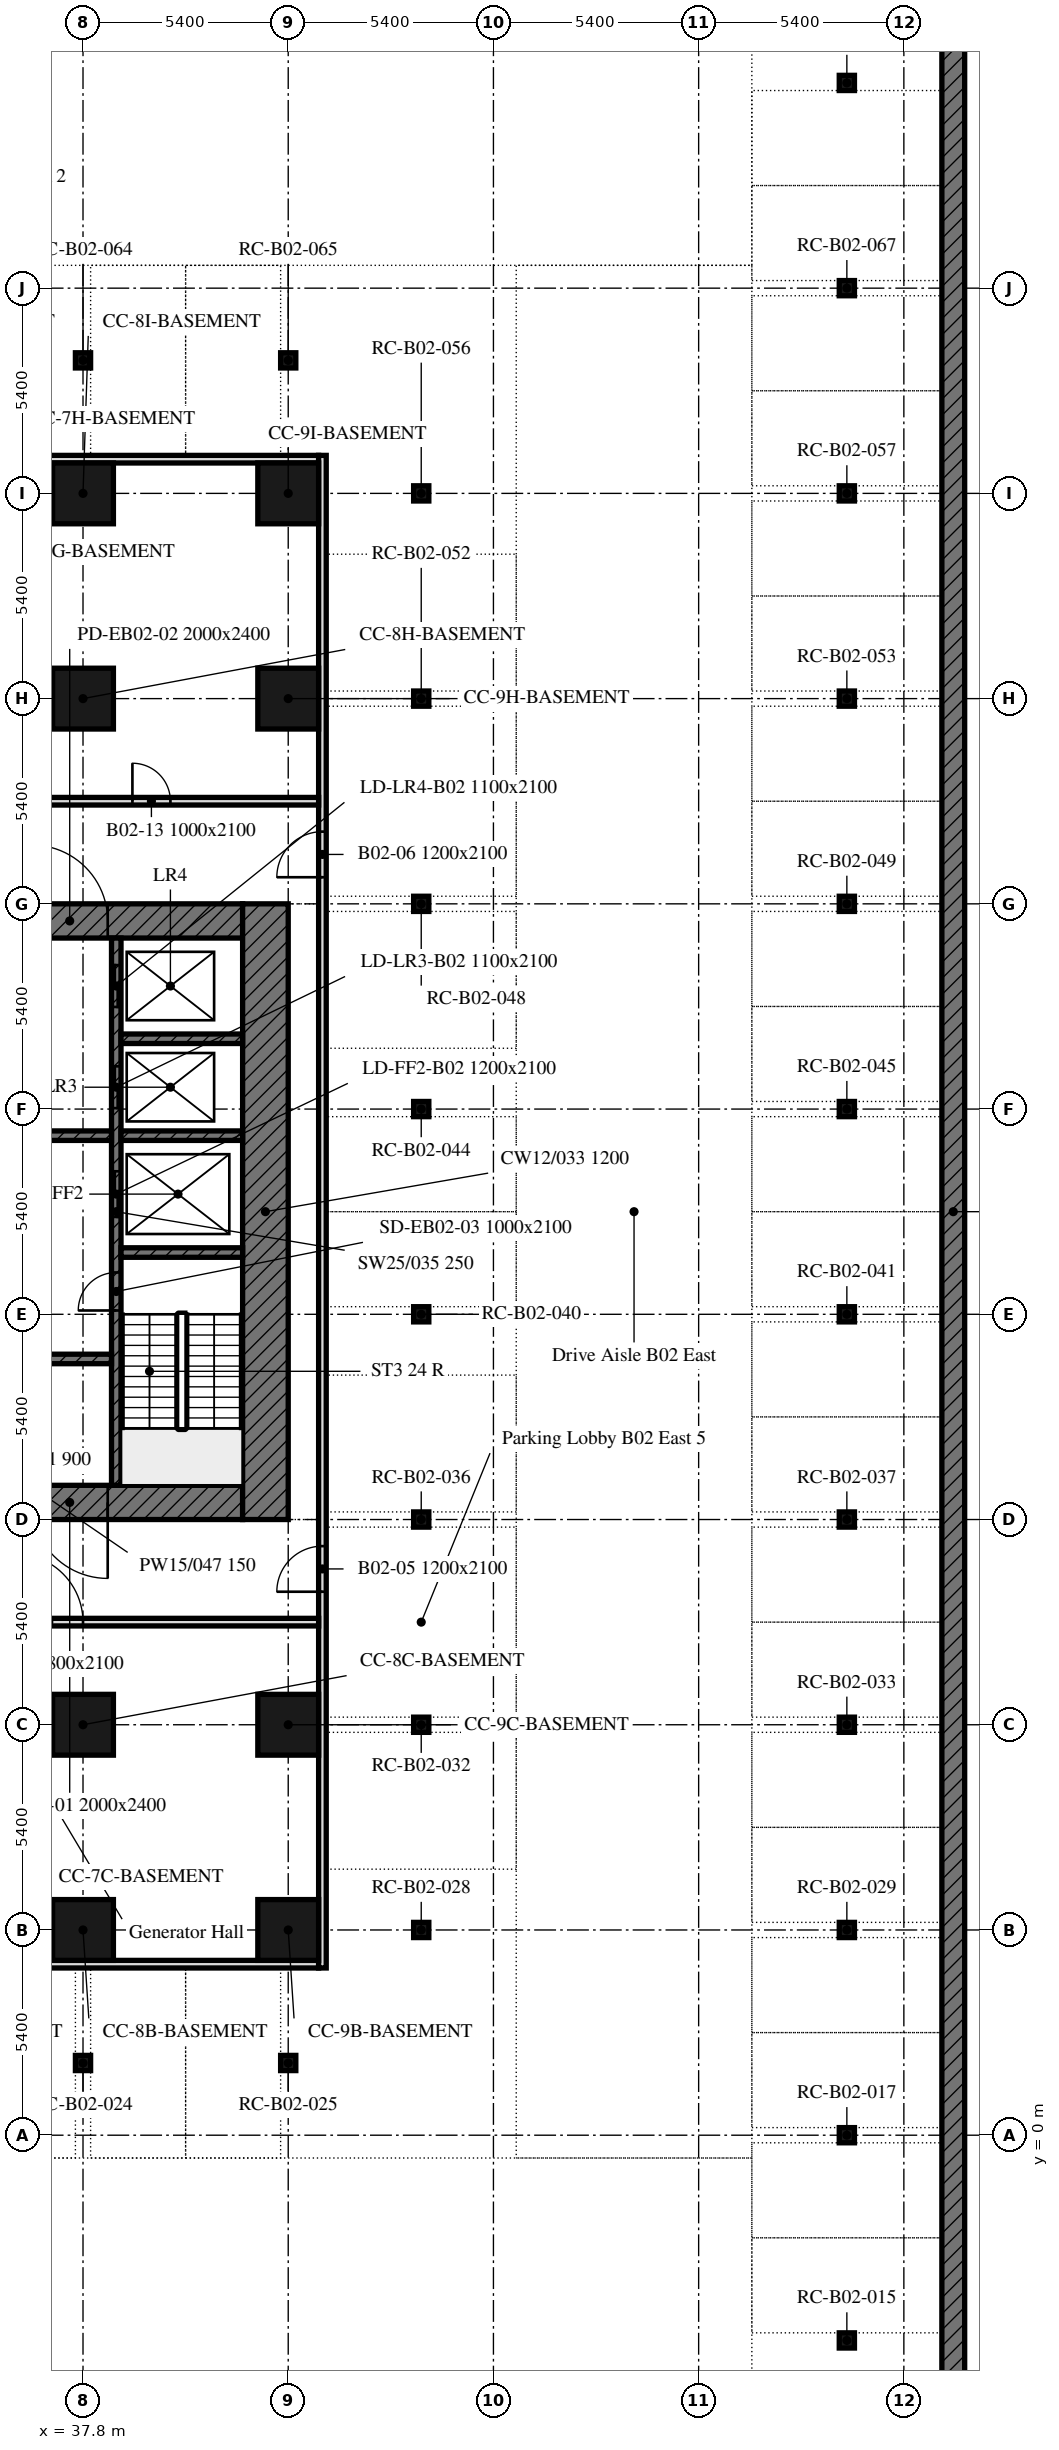
"""IFC4 building model, lengths in metres.
Left out: names, types, materials, properties, quantities, classifications, styles, units other than length and angle.
Written with IfcOpenShell. Run it as: python <this file> out.ifc"""

import sys

from ifc_helpers import new_model, si_unit, direction, frame, frame_2d, origin, origin_2d, place, context, subcontext, project, spatial, rectangle, extrude, element, fill, save


model = new_model("IFC4")
c1 = context("Model", 3, precision=1e-05, world=origin(), true_north=direction((0.0, 1.0)))
c2 = subcontext(c1, "Body", "Model", "MODEL_VIEW")
j1 = project(units=[si_unit("LENGTHUNIT", "METRE"), si_unit("PLANEANGLEUNIT", "RADIAN")], contexts=[c1])
p1 = place(None, origin())
s1 = spatial("IfcSite", under=j1, at=p1, CompositionType="ELEMENT")
p2 = place(p1, origin())
s2 = spatial("IfcBuilding", under=s1, at=p2, CompositionType="ELEMENT")
p3 = place(p2, frame((0.0, 0.0, -9.0)))
s3 = spatial("IfcBuildingStorey", under=s2, at=p3, CompositionType="ELEMENT", Elevation=-9.0)
p4 = place(p3, frame((60.7, -12.4, 0.0), z_axis=(0.0, 0.0, 1.0), x_axis=(0.0, 1.0, 0.0)))
e1 = element("IfcWall", 1, at=p4, inside=s3, PredefinedType="SOLIDWALL", context=c2, shape_type="SweptSolid", body=[
    extrude(rectangle(XDim=73.4, YDim=0.6, at=frame_2d((36.7, 0.0))), origin(), (0.0, 0.0, 1.0), 4.1),
])
for number, where, z_axis, x_axis in (
    (2, (37.8, 5.4, 0.0), (0.0, 0.0, 1.0), (1.0, 0.0, 0.0)),
    (3, (43.2, 5.4, 0.0), (0.0, 0.0, 1.0), (1.0, 0.0, 0.0)),
    (4, (37.8, 10.8, 0.0), (0.0, 0.0, 1.0), (1.0, 0.0, 0.0)),
    (5, (43.2, 10.8, 0.0), (0.0, 0.0, 1.0), (1.0, 0.0, 0.0)),
    (6, (37.8, 37.8, 0.0), (0.0, 0.0, 1.0), (1.0, 0.0, 0.0)),
    (7, (43.2, 37.8, 0.0), (0.0, 0.0, 1.0), (1.0, 0.0, 0.0)),
    (8, (37.8, 43.2, 0.0), (0.0, 0.0, 1.0), (1.0, 0.0, 0.0)),
    (9, (43.2, 43.2, 0.0), (0.0, 0.0, 1.0), (1.0, 0.0, 0.0)),
):
    element("IfcColumn", number, at=place(p3, frame(where, z_axis=z_axis, x_axis=x_axis)), inside=s3, PredefinedType="COLUMN", context=c2, shape_type="SweptSolid", body=[
        extrude(rectangle(XDim=1.6, YDim=1.6, at=origin_2d()), origin(), (0.0, 0.0, 1.0), 4.1),
    ])
for number, where, z_axis, x_axis in (
    (10, (57.9, -5.4, 0.0), (0.0, 0.0, 1.0), (1.0, 0.0, 0.0)),
    (11, (57.9, 0.0, 0.0), (0.0, 0.0, 1.0), (1.0, 0.0, 0.0)),
    (12, (37.8, 1.9, 0.0), (0.0, 0.0, 1.0), (1.0, 0.0, 0.0)),
    (13, (43.2, 1.9, 0.0), (0.0, 0.0, 1.0), (1.0, 0.0, 0.0)),
    (14, (46.7, 5.4, 0.0), (0.0, 0.0, 1.0), (1.0, 0.0, 0.0)),
    (15, (57.9, 5.4, 0.0), (0.0, 0.0, 1.0), (1.0, 0.0, 0.0)),
    (16, (46.7, 10.8, 0.0), (0.0, 0.0, 1.0), (1.0, 0.0, 0.0)),
    (17, (57.9, 10.8, 0.0), (0.0, 0.0, 1.0), (1.0, 0.0, 0.0)),
    (18, (46.7, 16.2, 0.0), (0.0, 0.0, 1.0), (1.0, 0.0, 0.0)),
    (19, (57.9, 16.2, 0.0), (0.0, 0.0, 1.0), (1.0, 0.0, 0.0)),
    (20, (46.7, 21.6, 0.0), (0.0, 0.0, 1.0), (1.0, 0.0, 0.0)),
    (21, (57.9, 21.6, 0.0), (0.0, 0.0, 1.0), (1.0, 0.0, 0.0)),
    (22, (46.7, 27.0, 0.0), (0.0, 0.0, 1.0), (1.0, 0.0, 0.0)),
    (23, (57.9, 27.0, 0.0), (0.0, 0.0, 1.0), (1.0, 0.0, 0.0)),
    (24, (46.7, 32.4, 0.0), (0.0, 0.0, 1.0), (1.0, 0.0, 0.0)),
    (25, (57.9, 32.4, 0.0), (0.0, 0.0, 1.0), (1.0, 0.0, 0.0)),
    (26, (46.7, 37.8, 0.0), (0.0, 0.0, 1.0), (1.0, 0.0, 0.0)),
    (27, (57.9, 37.8, 0.0), (0.0, 0.0, 1.0), (1.0, 0.0, 0.0)),
    (28, (46.7, 43.2, 0.0), (0.0, 0.0, 1.0), (1.0, 0.0, 0.0)),
    (29, (57.9, 43.2, 0.0), (0.0, 0.0, 1.0), (1.0, 0.0, 0.0)),
    (30, (37.8, 46.7, 0.0), (0.0, 0.0, 1.0), (1.0, 0.0, 0.0)),
    (31, (43.2, 46.7, 0.0), (0.0, 0.0, 1.0), (1.0, 0.0, 0.0)),
    (32, (57.9, 48.6, 0.0), (0.0, 0.0, 1.0), (1.0, 0.0, 0.0)),
    (33, (57.9, 54.0, 0.0), (0.0, 0.0, 1.0), (1.0, 0.0, 0.0)),
):
    element("IfcColumn", number, at=place(p3, frame(where, z_axis=z_axis, x_axis=x_axis)), inside=s3, PredefinedType="COLUMN", context=c2, shape_type="SweptSolid", body=[
        extrude(rectangle(XDim=0.4, YDim=0.4, at=origin_2d()), origin(), (0.0, 0.0, 1.0), 4.1),
    ])
p5 = place(p3, frame((4.6, 4.5, 0.0), z_axis=(0.0, 0.0, 1.0), x_axis=(1.0, 0.0, 0.0)))
e34 = element("IfcWall", 34, at=p5, inside=s3, PredefinedType="PARTITIONING", context=c2, shape_type="SweptSolid", body=[
    extrude(rectangle(XDim=39.4, YDim=0.2, at=frame_2d((19.7, 0.0))), origin(), (0.0, 0.0, 1.0), 4.1),
])
p6 = place(p5, frame((18.3, 0.0, 0.0)))
e35 = element("IfcOpeningElement", 35, at=p6, cuts=e34, PredefinedType="OPENING", context=c2, shape_type="SweptSolid", body=[
    extrude(rectangle(XDim=1.2, YDim=2.1, at=frame_2d((0.6, 1.05))), frame((0.0, 0.11, 0.0), z_axis=(0.0, -1.0, 0.0), x_axis=(1.0, 0.0, 0.0)), (0.0, 0.0, 1.0), 0.22),
])
p7 = place(p3, frame((4.6, 44.1, 0.0), z_axis=(0.0, 0.0, 1.0), x_axis=(1.0, 0.0, 0.0)))
e36 = element("IfcWall", 36, at=p7, inside=s3, PredefinedType="PARTITIONING", context=c2, shape_type="SweptSolid", body=[
    extrude(rectangle(XDim=39.4, YDim=0.2, at=frame_2d((19.7, 0.0))), origin(), (0.0, 0.0, 1.0), 4.1),
])
p8 = place(p7, frame((23.4, 0.0, 0.0)))
e37 = element("IfcOpeningElement", 37, at=p8, cuts=e36, PredefinedType="OPENING", context=c2, shape_type="SweptSolid", body=[
    extrude(rectangle(XDim=1.2, YDim=2.1, at=frame_2d((0.6, 1.05))), frame((0.0, 0.11, 0.0), z_axis=(0.0, -1.0, 0.0), x_axis=(1.0, 0.0, 0.0)), (0.0, 0.0, 1.0), 0.22),
])
p9 = place(p3, frame((44.1, 4.4, 0.0), z_axis=(0.0, 0.0, 1.0), x_axis=(0.0, 1.0, 0.0)))
e38 = element("IfcWall", 38, at=p9, inside=s3, PredefinedType="PARTITIONING", context=c2, shape_type="SweptSolid", body=[
    extrude(rectangle(XDim=39.8, YDim=0.2, at=frame_2d((19.9, 0.0))), origin(), (0.0, 0.0, 1.0), 4.1),
])
p10 = place(p9, frame((9.9, 0.0, 0.0)))
e39 = element("IfcOpeningElement", 39, at=p10, cuts=e38, PredefinedType="OPENING", context=c2, shape_type="SweptSolid", body=[
    extrude(rectangle(XDim=1.2, YDim=2.1, at=frame_2d((0.6, 1.05))), frame((0.0, 0.11, 0.0), z_axis=(0.0, -1.0, 0.0), x_axis=(1.0, 0.0, 0.0)), (0.0, 0.0, 1.0), 0.22),
])
p11 = place(p9, frame((28.7, 0.0, 0.0)))
e40 = element("IfcOpeningElement", 40, at=p11, cuts=e38, PredefinedType="OPENING", context=c2, shape_type="SweptSolid", body=[
    extrude(rectangle(XDim=1.2, YDim=2.1, at=frame_2d((0.6, 1.05))), frame((0.0, 0.11, 0.0), z_axis=(0.0, -1.0, 0.0), x_axis=(1.0, 0.0, 0.0)), (0.0, 0.0, 1.0), 0.22),
])
p12 = place(p3, frame((29.8, 13.5, 0.0), z_axis=(0.0, 0.0, 1.0), x_axis=(1.0, 0.0, 0.0)))
e41 = element("IfcWall", 41, at=p12, inside=s3, PredefinedType="PARTITIONING", context=c2, shape_type="SweptSolid", body=[
    extrude(rectangle(XDim=14.2, YDim=0.2, at=frame_2d((7.1, 0.0))), origin(), (0.0, 0.0, 1.0), 4.1),
])
p13 = place(p12, frame((6.2, 0.0, 0.0)))
e42 = element("IfcOpeningElement", 42, at=p13, cuts=e41, PredefinedType="OPENING", context=c2, shape_type="SweptSolid", body=[
    extrude(rectangle(XDim=1.8, YDim=2.1, at=frame_2d((0.9, 1.05))), frame((0.0, 0.11, 0.0), z_axis=(0.0, -1.0, 0.0), x_axis=(1.0, 0.0, 0.0)), (0.0, 0.0, 1.0), 0.22),
])
p14 = place(p3, frame((35.2, 35.1, 0.0), z_axis=(0.0, 0.0, 1.0), x_axis=(1.0, 0.0, 0.0)))
e43 = element("IfcWall", 43, at=p14, inside=s3, PredefinedType="PARTITIONING", context=c2, shape_type="SweptSolid", body=[
    extrude(rectangle(XDim=8.8, YDim=0.2, at=frame_2d((4.4, 0.0))), origin(), (0.0, 0.0, 1.0), 4.1),
])
p15 = place(p14, frame((3.9, 0.0, 0.0)))
e44 = element("IfcOpeningElement", 44, at=p15, cuts=e43, PredefinedType="OPENING", context=c2, shape_type="SweptSolid", body=[
    extrude(rectangle(XDim=1.0, YDim=2.1, at=frame_2d((0.5, 1.05))), frame((0.0, 0.11, 0.0), z_axis=(0.0, -1.0, 0.0), x_axis=(1.0, 0.0, 0.0)), (0.0, 0.0, 1.0), 0.22),
])
p16 = place(p3, frame((42.0, 16.65, 0.0), z_axis=(0.0, 0.0, 1.0), x_axis=(-1.0, 0.0, 0.0)))
e45 = element("IfcWall", 45, at=p16, inside=s3, PredefinedType="SOLIDWALL", context=c2, shape_type="SweptSolid", body=[
    extrude(rectangle(XDim=11.1, YDim=0.9, at=frame_2d((5.55, 0.0))), origin(), (0.0, 0.0, 1.0), 4.1),
])
p17 = place(p16, frame((3.55, 0.0, 0.0)))
e46 = element("IfcOpeningElement", 46, at=p17, cuts=e45, PredefinedType="OPENING", context=c2, shape_type="SweptSolid", body=[
    extrude(rectangle(XDim=2.0, YDim=2.4, at=frame_2d((1.0, 1.2))), frame((0.0, 0.45, 0.0), z_axis=(0.0, -1.0, 0.0), x_axis=(1.0, 0.0, 0.0)), (0.0, 0.0, 1.0), 0.9),
])
p18 = place(p3, frame((30.9, 31.95, 0.0), z_axis=(0.0, 0.0, 1.0), x_axis=(1.0, 0.0, 0.0)))
e47 = element("IfcWall", 47, at=p18, inside=s3, PredefinedType="SOLIDWALL", context=c2, shape_type="SweptSolid", body=[
    extrude(rectangle(XDim=11.1, YDim=0.9, at=frame_2d((5.55, 0.0))), origin(), (0.0, 0.0, 1.0), 4.1),
])
p19 = place(p18, frame((5.55, 0.0, 0.0)))
e48 = element("IfcOpeningElement", 48, at=p19, cuts=e47, PredefinedType="OPENING", context=c2, shape_type="SweptSolid", body=[
    extrude(rectangle(XDim=2.0, YDim=2.4, at=frame_2d((1.0, 1.2))), frame((0.0, 0.45, 0.0), z_axis=(0.0, -1.0, 0.0), x_axis=(1.0, 0.0, 0.0)), (0.0, 0.0, 1.0), 0.9),
])
p20 = place(p3, frame((42.6, 32.4, 0.0), z_axis=(0.0, 0.0, 1.0), x_axis=(0.0, -1.0, 0.0)))
e49 = element("IfcWall", 49, at=p20, inside=s3, PredefinedType="SOLIDWALL", context=c2, shape_type="SweptSolid", body=[
    extrude(rectangle(XDim=16.2, YDim=1.2, at=frame_2d((8.1, 0.0))), origin(), (0.0, 0.0, 1.0), 4.1),
])
p21 = place(p3, frame((38.675, 17.1, 0.0), z_axis=(0.0, 0.0, 1.0), x_axis=(0.0, 1.0, 0.0)))
e50 = element("IfcWall", 50, at=p21, inside=s3, PredefinedType="SOLIDWALL", context=c2, shape_type="SweptSolid", body=[
    extrude(rectangle(XDim=14.4, YDim=0.25, at=frame_2d((7.2, 0.0))), origin(), (0.0, 0.0, 1.0), 4.1),
])
p22 = place(p21, frame((4.6, 0.0, 0.0)))
e51 = element("IfcOpeningElement", 51, at=p22, cuts=e50, PredefinedType="OPENING", context=c2, shape_type="SweptSolid", body=[
    extrude(rectangle(XDim=1.0, YDim=2.1, at=frame_2d((0.5, 1.05))), frame((0.0, 0.125, 0.0), z_axis=(0.0, -1.0, 0.0), x_axis=(1.0, 0.0, 0.0)), (0.0, 0.0, 1.0), 0.25),
])
p23 = place(p21, frame((7.062, 0.0, 0.0)))
e52 = element("IfcOpeningElement", 52, at=p23, cuts=e50, PredefinedType="OPENING", context=c2, shape_type="SweptSolid", body=[
    extrude(rectangle(XDim=1.2, YDim=2.1, at=frame_2d((0.6, 1.05))), frame((0.0, 0.125, 0.0), z_axis=(0.0, -1.0, 0.0), x_axis=(1.0, 0.0, 0.0)), (0.0, 0.0, 1.0), 0.25),
])
p24 = place(p21, frame((9.925, 0.0, 0.0)))
e53 = element("IfcOpeningElement", 53, at=p24, cuts=e50, PredefinedType="OPENING", context=c2, shape_type="SweptSolid", body=[
    extrude(rectangle(XDim=1.1, YDim=2.1, at=frame_2d((0.55, 1.05))), frame((0.0, 0.125, 0.0), z_axis=(0.0, -1.0, 0.0), x_axis=(1.0, 0.0, 0.0)), (0.0, 0.0, 1.0), 0.25),
])
p25 = place(p21, frame((12.587, 0.0, 0.0)))
e54 = element("IfcOpeningElement", 54, at=p25, cuts=e50, PredefinedType="OPENING", context=c2, shape_type="SweptSolid", body=[
    extrude(rectangle(XDim=1.1, YDim=2.1, at=frame_2d((0.55, 1.05))), frame((0.0, 0.125, 0.0), z_axis=(0.0, -1.0, 0.0), x_axis=(1.0, 0.0, 0.0)), (0.0, 0.0, 1.0), 0.25),
])
for number, where, z_axis, x_axis in (
    (55, (38.8, 23.225, 0.0), (0.0, 0.0, 1.0), (1.0, 0.0, 0.0)),
    (56, (38.8, 26.3, 0.0), (0.0, 0.0, 1.0), (1.0, 0.0, 0.0)),
):
    element("IfcWall", number, at=place(p3, frame(where, z_axis=z_axis, x_axis=x_axis)), inside=s3, PredefinedType="SOLIDWALL", context=c2, shape_type="SweptSolid", body=[
        extrude(rectangle(XDim=3.2, YDim=0.25, at=frame_2d((1.6, 0.0))), origin(), (0.0, 0.0, 1.0), 4.1),
    ])
for number, where, z_axis, x_axis in (
    (57, (35.8, 26.3, 0.0), (0.0, 0.0, 1.0), (1.0, 0.0, 0.0)),
    (58, (35.8, 20.425, 0.0), (0.0, 0.0, 1.0), (1.0, 0.0, 0.0)),
):
    element("IfcWall", number, at=place(p3, frame(where, z_axis=z_axis, x_axis=x_axis)), inside=s3, PredefinedType="SOLIDWALL", context=c2, shape_type="SweptSolid", body=[
        extrude(rectangle(XDim=2.75, YDim=0.25, at=frame_2d((1.375, 0.0))), origin(), (0.0, 0.0, 1.0), 4.1),
    ])
p26 = place(p3, frame((38.8, 28.85, 0.0), z_axis=(0.0, 0.0, 1.0), x_axis=(1.0, 0.0, 0.0)))
e59 = element("IfcWall", 59, at=p26, inside=s3, PredefinedType="SOLIDWALL", context=c2, shape_type="SweptSolid", body=[
    extrude(rectangle(XDim=3.2, YDim=0.25, at=frame_2d((1.6, 0.0))), origin(), (0.0, 0.0, 1.0), 4.1),
])
p27 = place(p10, origin())
e60 = element("IfcDoor", 60, at=p27, inside=s3, OperationType="SINGLE_SWING_LEFT", PredefinedType="DOOR", context=c2, shape_type="SweptSolid", body=[
    extrude(rectangle(XDim=1.2, YDim=2.1, at=frame_2d((0.6, 1.05))), frame((0.0, 0.025, 0.0), z_axis=(0.0, -1.0, 0.0), x_axis=(1.0, 0.0, 0.0)), (0.0, 0.0, 1.0), 0.05),
])
fill(e39, e60)
p28 = place(p11, origin())
e61 = element("IfcDoor", 61, at=p28, inside=s3, OperationType="SINGLE_SWING_LEFT", PredefinedType="DOOR", context=c2, shape_type="SweptSolid", body=[
    extrude(rectangle(XDim=1.2, YDim=2.1, at=frame_2d((0.6, 1.05))), frame((0.0, 0.025, 0.0), z_axis=(0.0, -1.0, 0.0), x_axis=(1.0, 0.0, 0.0)), (0.0, 0.0, 1.0), 0.05),
])
fill(e40, e61)
p29 = place(p13, origin())
e62 = element("IfcDoor", 62, at=p29, inside=s3, OperationType="DOUBLE_DOOR_SINGLE_SWING", PredefinedType="DOOR", context=c2, shape_type="SweptSolid", body=[
    extrude(rectangle(XDim=1.8, YDim=2.1, at=frame_2d((0.9, 1.05))), frame((0.0, 0.025, 0.0), z_axis=(0.0, -1.0, 0.0), x_axis=(1.0, 0.0, 0.0)), (0.0, 0.0, 1.0), 0.05),
])
fill(e42, e62)
p30 = place(p15, origin())
e63 = element("IfcDoor", 63, at=p30, inside=s3, OperationType="SINGLE_SWING_LEFT", PredefinedType="DOOR", context=c2, shape_type="SweptSolid", body=[
    extrude(rectangle(XDim=1.0, YDim=2.1, at=frame_2d((0.5, 1.05))), frame((0.0, 0.025, 0.0), z_axis=(0.0, -1.0, 0.0), x_axis=(1.0, 0.0, 0.0)), (0.0, 0.0, 1.0), 0.05),
])
fill(e44, e63)
p31 = place(p17, origin())
e64 = element("IfcDoor", 64, at=p31, inside=s3, OperationType="DOUBLE_DOOR_SINGLE_SWING", PredefinedType="DOOR", context=c2, shape_type="SweptSolid", body=[
    extrude(rectangle(XDim=2.0, YDim=2.4, at=frame_2d((1.0, 1.2))), frame((0.0, 0.025, 0.0), z_axis=(0.0, -1.0, 0.0), x_axis=(1.0, 0.0, 0.0)), (0.0, 0.0, 1.0), 0.05),
])
fill(e46, e64)
p32 = place(p19, origin())
e65 = element("IfcDoor", 65, at=p32, inside=s3, OperationType="DOUBLE_DOOR_SINGLE_SWING", PredefinedType="DOOR", context=c2, shape_type="SweptSolid", body=[
    extrude(rectangle(XDim=2.0, YDim=2.4, at=frame_2d((1.0, 1.2))), frame((0.0, 0.025, 0.0), z_axis=(0.0, -1.0, 0.0), x_axis=(1.0, 0.0, 0.0)), (0.0, 0.0, 1.0), 0.05),
])
fill(e48, e65)
p33 = place(p22, origin())
e66 = element("IfcDoor", 66, at=p33, inside=s3, OperationType="SINGLE_SWING_LEFT", PredefinedType="DOOR", context=c2, shape_type="SweptSolid", body=[
    extrude(rectangle(XDim=1.0, YDim=2.1, at=frame_2d((0.5, 1.05))), frame((0.0, 0.025, 0.0), z_axis=(0.0, -1.0, 0.0), x_axis=(1.0, 0.0, 0.0)), (0.0, 0.0, 1.0), 0.05),
])
fill(e51, e66)
p34 = place(p23, origin())
e67 = element("IfcDoor", 67, at=p34, inside=s3, OperationType="DOUBLE_DOOR_SLIDING", PredefinedType="DOOR", context=c2, shape_type="SweptSolid", body=[
    extrude(rectangle(XDim=1.2, YDim=2.1, at=frame_2d((0.6, 1.05))), frame((0.0, 0.025, 0.0), z_axis=(0.0, -1.0, 0.0), x_axis=(1.0, 0.0, 0.0)), (0.0, 0.0, 1.0), 0.05),
])
fill(e52, e67)
p35 = place(p24, origin())
e68 = element("IfcDoor", 68, at=p35, inside=s3, OperationType="DOUBLE_DOOR_SLIDING", PredefinedType="DOOR", context=c2, shape_type="SweptSolid", body=[
    extrude(rectangle(XDim=1.1, YDim=2.1, at=frame_2d((0.55, 1.05))), frame((0.0, 0.025, 0.0), z_axis=(0.0, -1.0, 0.0), x_axis=(1.0, 0.0, 0.0)), (0.0, 0.0, 1.0), 0.05),
])
fill(e53, e68)
p36 = place(p25, origin())
e69 = element("IfcDoor", 69, at=p36, inside=s3, OperationType="DOUBLE_DOOR_SLIDING", PredefinedType="DOOR", context=c2, shape_type="SweptSolid", body=[
    extrude(rectangle(XDim=1.1, YDim=2.1, at=frame_2d((0.55, 1.05))), frame((0.0, 0.025, 0.0), z_axis=(0.0, -1.0, 0.0), x_axis=(1.0, 0.0, 0.0)), (0.0, 0.0, 1.0), 0.05),
])
fill(e54, e69)
save(model, sys.argv[1])
